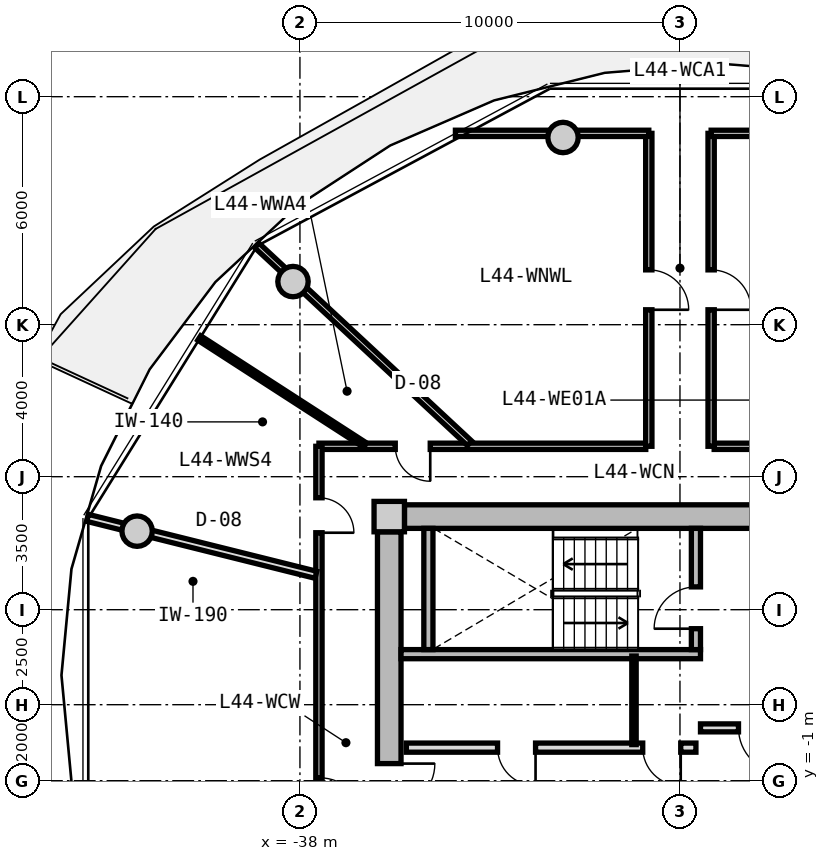
"""IFC4 building model, lengths in metres.
Left out: names, types, materials, properties, quantities, classifications, styles, units other than length and angle.
Written with IfcOpenShell. Run it as: python <this file> out.ifc"""

import sys

from ifc_helpers import new_model, si_unit, direction, frame, frame_2d, origin, origin_2d, place, context, subcontext, project, spatial, rectangle, circle, extrude, source, transform, mapped, element, fill, save


model = new_model("IFC4")
c1 = context("Model", 3, precision=1e-05, world=origin(), true_north=direction((0.0, 1.0)))
c2 = subcontext(c1, "Body", "Model", "MODEL_VIEW")
j1 = project(units=[si_unit("LENGTHUNIT", "METRE"), si_unit("PLANEANGLEUNIT", "RADIAN")], contexts=[c1])
p1 = place(None, origin())
s1 = spatial("IfcSite", under=j1, at=p1, CompositionType="ELEMENT")
p2 = place(p1, origin())
s2 = spatial("IfcBuilding", under=s1, at=p2, CompositionType="ELEMENT")
p3 = place(p2, frame((0.0, 0.0, 143.45)))
s3 = spatial("IfcBuildingStorey", under=s2, at=p3, CompositionType="ELEMENT", Elevation=143.45)
m1 = source(origin(), c2, "Body", "SweptSolid", [
    extrude(rectangle(XDim=0.8, YDim=0.8, at=origin_2d()), origin(), (0.0, 0.0, 1.0), 3.05),
])
p4 = place(p3, frame((-35.65, 5.95, 0.0), z_axis=(0.0, 0.0, 1.0), x_axis=(1.0, 0.0, 0.0)))
e1 = element("IfcColumn", 1, at=p4, inside=s3, PredefinedType="COLUMN", context=c2, shape_type="MappedRepresentation", body=[
    mapped(m1, transform((0.0, 0.0, 0.0), x_axis=(1.0, 0.0, 0.0), y_axis=(0.0, 1.0, 0.0), z_axis=(0.0, 0.0, 1.0), scale=1.0)),
])
m2 = source(origin(), c2, "Body", "SweptSolid", [
    extrude(rectangle(XDim=14.5, YDim=0.62, at=frame_2d((7.25, 0.0))), origin(), (0.0, 0.0, 1.0), 2.81),
])
p5 = place(p3, frame((-35.25, 5.95, 0.0), z_axis=(0.0, 0.0, 1.0), x_axis=(1.0, 0.0, 0.0)))
e2 = element("IfcWall", 2, at=p5, inside=s3, PredefinedType="SHEAR", context=c2, shape_type="MappedRepresentation", body=[
    mapped(m2, transform((0.0, 0.0, 0.0), x_axis=(1.0, 0.0, 0.0), y_axis=(0.0, 1.0, 0.0), z_axis=(0.0, 0.0, 1.0), scale=1.0)),
])
m3 = source(origin(), c2, "Body", "SweptSolid", [
    extrude(rectangle(XDim=11.1, YDim=0.62, at=frame_2d((5.55, 0.0))), origin(), (0.0, 0.0, 1.0), 2.81),
])
p6 = place(p3, frame((-35.65, -5.55, 0.0), z_axis=(0.0, 0.0, 1.0), x_axis=(0.0, 1.0, 0.0)))
e3 = element("IfcWall", 3, at=p6, inside=s3, PredefinedType="SHEAR", context=c2, shape_type="MappedRepresentation", body=[
    mapped(m3, transform((0.0, 0.0, 0.0), x_axis=(1.0, 0.0, 0.0), y_axis=(0.0, 1.0, 0.0), z_axis=(0.0, 0.0, 1.0), scale=1.0)),
])
p7 = place(p6, frame((3.8, 0.0, 0.0)))
e4 = element("IfcOpeningElement", 4, at=p7, cuts=e3, PredefinedType="OPENING", context=c2, shape_type="SweptSolid", body=[
    extrude(rectangle(XDim=1.2, YDim=2.15, at=frame_2d((0.6, 1.075))), frame((0.0, 0.32, 0.0), z_axis=(0.0, -1.0, 0.0), x_axis=(1.0, 0.0, 0.0)), (0.0, 0.0, 1.0), 0.64),
])
m4 = source(origin(), c2, "Body", "SweptSolid", [
    extrude(circle(Radius=0.4, at=origin_2d()), origin(), (0.0, 0.0, 1.0), 3.05),
])
for number, where, z_axis, x_axis in (
    (5, (-31.077, 15.926, 0.0), (0.0, 0.0, 1.0), (1.0, 0.0, 0.0)),
    (6, (-38.183, 12.135, 0.0), (0.0, 0.0, 1.0), (1.0, 0.0, 0.0)),
    (7, (-42.285, 5.567, 0.0), (0.0, 0.0, 1.0), (1.0, 0.0, 0.0)),
):
    element("IfcColumn", number, at=place(p3, frame(where, z_axis=z_axis, x_axis=x_axis)), inside=s3, PredefinedType="COLUMN", context=c2, shape_type="MappedRepresentation", body=[
        mapped(m4, transform((0.0, 0.0, 0.0), x_axis=(1.0, 0.0, 0.0), y_axis=(0.0, 1.0, 0.0), z_axis=(0.0, 0.0, 1.0), scale=1.0)),
    ])
m5 = source(origin(), c2, "Body", "SweptSolid", [
    extrude(rectangle(XDim=7.88, YDim=0.24, at=frame_2d((3.94, 0.0))), origin(), (0.0, 0.0, 1.0), 2.81),
])
p8 = place(p3, frame((-35.34, 2.33, 0.0), z_axis=(0.0, 0.0, 1.0), x_axis=(1.0, 0.0, 0.0)))
e8 = element("IfcWall", 8, at=p8, inside=s3, PredefinedType="PARTITIONING", context=c2, shape_type="MappedRepresentation", body=[
    mapped(m5, transform((0.0, 0.0, 0.0), x_axis=(1.0, 0.0, 0.0), y_axis=(0.0, 1.0, 0.0), z_axis=(0.0, 0.0, 1.0), scale=1.0)),
])
m6 = source(origin(), c2, "Body", "SweptSolid", [
    extrude(rectangle(XDim=3.19, YDim=0.24, at=frame_2d((1.595, 0.0))), origin(), (0.0, 0.0, 1.0), 2.81),
])
p9 = place(p3, frame((-34.62, 2.45, 0.0), z_axis=(0.0, 0.0, 1.0), x_axis=(0.0, 1.0, 0.0)))
e9 = element("IfcWall", 9, at=p9, inside=s3, PredefinedType="PARTITIONING", context=c2, shape_type="MappedRepresentation", body=[
    mapped(m6, transform((0.0, 0.0, 0.0), x_axis=(1.0, 0.0, 0.0), y_axis=(0.0, 1.0, 0.0), z_axis=(0.0, 0.0, 1.0), scale=1.0)),
])
p10 = place(p3, frame((-27.58, 2.45, 0.0), z_axis=(0.0, 0.0, 1.0), x_axis=(0.0, 1.0, 0.0)))
e10 = element("IfcWall", 10, at=p10, inside=s3, PredefinedType="PARTITIONING", context=c2, shape_type="MappedRepresentation", body=[
    mapped(m6, transform((0.0, 0.0, 0.0), x_axis=(1.0, 0.0, 0.0), y_axis=(0.0, 1.0, 0.0), z_axis=(0.0, 0.0, 1.0), scale=1.0)),
])
p11 = place(p10, frame((0.55, 0.0, 0.0)))
e11 = element("IfcOpeningElement", 11, at=p11, cuts=e10, PredefinedType="OPENING", context=c2, shape_type="SweptSolid", body=[
    extrude(rectangle(XDim=1.1, YDim=2.15, at=frame_2d((0.55, 1.075))), frame((0.0, 0.13, 0.0), z_axis=(0.0, -1.0, 0.0), x_axis=(1.0, 0.0, 0.0)), (0.0, 0.0, 1.0), 0.26),
])
m7 = source(origin(), c2, "Body", "SweptSolid", [
    extrude(rectangle(XDim=6.66, YDim=0.21, at=frame_2d((3.33, 0.0))), origin(), (0.0, 0.0, 1.0), 2.795),
])
p12 = place(p3, frame((-27.46, 0.39, 0.0), z_axis=(0.0, 0.0, 1.0), x_axis=(1.0, 0.0, 0.0)))
e12 = element("IfcWall", 12, at=p12, inside=s3, PredefinedType="PARTITIONING", context=c2, shape_type="MappedRepresentation", body=[
    mapped(m7, transform((0.0, 0.0, 0.0), x_axis=(1.0, 0.0, 0.0), y_axis=(0.0, 1.0, 0.0), z_axis=(0.0, 0.0, 1.0), scale=1.0)),
])
p13 = place(p12, frame((1.0, 0.0, 0.0)))
e13 = element("IfcOpeningElement", 13, at=p13, cuts=e12, PredefinedType="OPENING", context=c2, shape_type="SweptSolid", body=[
    extrude(rectangle(XDim=1.2, YDim=2.15, at=frame_2d((0.6, 1.075))), frame((0.0, 0.115, 0.0), z_axis=(0.0, -1.0, 0.0), x_axis=(1.0, 0.0, 0.0)), (0.0, 0.0, 1.0), 0.23),
])
m8 = source(origin(), c2, "Body", "SweptSolid", [
    extrude(rectangle(XDim=7.62, YDim=0.24, at=frame_2d((3.81, 0.0))), origin(), (0.0, 0.0, 1.0), 2.795),
])
p14 = place(p3, frame((-35.2, -0.13, 0.0), z_axis=(0.0, 0.0, 1.0), x_axis=(1.0, 0.0, 0.0)))
e14 = element("IfcWall", 14, at=p14, inside=s3, PredefinedType="PARTITIONING", context=c2, shape_type="MappedRepresentation", body=[
    mapped(m8, transform((0.0, 0.0, 0.0), x_axis=(1.0, 0.0, 0.0), y_axis=(0.0, 1.0, 0.0), z_axis=(0.0, 0.0, 1.0), scale=1.0)),
])
p15 = place(p14, frame((6.22, 0.0, 0.0)))
e15 = element("IfcOpeningElement", 15, at=p15, cuts=e14, PredefinedType="OPENING", context=c2, shape_type="SweptSolid", body=[
    extrude(rectangle(XDim=1.0, YDim=2.1, at=frame_2d((0.5, 1.05))), frame((0.0, 0.13, 0.0), z_axis=(0.0, -1.0, 0.0), x_axis=(1.0, 0.0, 0.0)), (0.0, 0.0, 1.0), 0.26),
])
p16 = place(p14, frame((2.4, 0.0, 0.0)))
e16 = element("IfcOpeningElement", 16, at=p16, cuts=e14, PredefinedType="OPENING", context=c2, shape_type="SweptSolid", body=[
    extrude(rectangle(XDim=1.0, YDim=2.1, at=frame_2d((0.5, 1.05))), frame((0.0, 0.13, 0.0), z_axis=(0.0, -1.0, 0.0), x_axis=(1.0, 0.0, 0.0)), (0.0, 0.0, 1.0), 0.26),
])
m9 = source(origin(), c2, "Body", "SweptSolid", [
    extrude(rectangle(XDim=2.33, YDim=0.115, at=frame_2d((1.165, 0.0))), origin(), (0.0, 0.0, 1.0), 2.795),
])
p17 = place(p3, frame((-29.21, -0.05, 0.0), z_axis=(0.0, 0.0, 1.0), x_axis=(0.0, 1.0, 0.0)))
e17 = element("IfcWall", 17, at=p17, inside=s3, PredefinedType="PARTITIONING", context=c2, shape_type="MappedRepresentation", body=[
    mapped(m9, transform((0.0, 0.0, 0.0), x_axis=(1.0, 0.0, 0.0), y_axis=(0.0, 1.0, 0.0), z_axis=(0.0, 0.0, 1.0), scale=1.0)),
])
m10 = source(origin(), c2, "Body", "SweptSolid", [
    extrude(rectangle(XDim=8.6, YDim=0.165, at=frame_2d((4.3, 0.0))), origin(), (0.0, 0.0, 1.0), 2.795),
])
p18 = place(p3, frame((-37.5, 7.8, 0.0), z_axis=(0.0, 0.0, 1.0), x_axis=(1.0, 0.0, 0.0)))
e18 = element("IfcWall", 18, at=p18, inside=s3, PredefinedType="PARTITIONING", context=c2, shape_type="MappedRepresentation", body=[
    mapped(m10, transform((0.0, 0.0, 0.0), x_axis=(1.0, 0.0, 0.0), y_axis=(0.0, 1.0, 0.0), z_axis=(0.0, 0.0, 1.0), scale=1.0)),
])
p19 = place(p18, frame((2.009, 0.0, 0.0)))
e19 = element("IfcOpeningElement", 19, at=p19, cuts=e18, PredefinedType="OPENING", context=c2, shape_type="SweptSolid", body=[
    extrude(rectangle(XDim=0.92, YDim=2.1, at=frame_2d((0.46, 1.05))), frame((0.0, 0.093, 0.0), z_axis=(0.0, -1.0, 0.0), x_axis=(1.0, 0.0, 0.0)), (0.0, 0.0, 1.0), 0.185),
])
p20 = place(p3, frame((-27.1, 7.8, 0.0), z_axis=(0.0, 0.0, 1.0), x_axis=(1.0, 0.0, 0.0)))
e20 = element("IfcWall", 20, at=p20, inside=s3, PredefinedType="PARTITIONING", context=c2, shape_type="MappedRepresentation", body=[
    mapped(m10, transform((0.0, 0.0, 0.0), x_axis=(1.0, 0.0, 0.0), y_axis=(0.0, 1.0, 0.0), z_axis=(0.0, 0.0, 1.0), scale=1.0)),
])
p21 = place(p20, frame((6.96, 0.0, 0.0)))
e21 = element("IfcOpeningElement", 21, at=p21, cuts=e20, PredefinedType="OPENING", context=c2, shape_type="SweptSolid", body=[
    extrude(rectangle(XDim=1.05, YDim=2.15, at=frame_2d((0.525, 1.075))), frame((0.0, 0.093, 0.0), z_axis=(0.0, -1.0, 0.0), x_axis=(1.0, 0.0, 0.0)), (0.0, 0.0, 1.0), 0.185),
])
p22 = place(p20, frame((3.904, 0.0, 0.0)))
e22 = element("IfcOpeningElement", 22, at=p22, cuts=e20, PredefinedType="OPENING", context=c2, shape_type="SweptSolid", body=[
    extrude(rectangle(XDim=1.05, YDim=2.15, at=frame_2d((0.525, 1.075))), frame((0.0, 0.093, 0.0), z_axis=(0.0, -1.0, 0.0), x_axis=(1.0, 0.0, 0.0)), (0.0, 0.0, 1.0), 0.185),
])
p23 = place(p20, frame((2.347, 0.0, 0.0)))
e23 = element("IfcOpeningElement", 23, at=p23, cuts=e20, PredefinedType="OPENING", context=c2, shape_type="SweptSolid", body=[
    extrude(rectangle(XDim=1.05, YDim=2.15, at=frame_2d((0.525, 1.075))), frame((0.0, 0.093, 0.0), z_axis=(0.0, -1.0, 0.0), x_axis=(1.0, 0.0, 0.0)), (0.0, 0.0, 1.0), 0.185),
])
m11 = source(origin(), c2, "Body", "SweptSolid", [
    extrude(rectangle(XDim=15.6, YDim=0.165, at=frame_2d((7.8, 0.0))), origin(), (0.0, 0.0, 1.0), 2.795),
])
p24 = place(p3, frame((-37.5, -7.8, 0.0), z_axis=(0.0, 0.0, 1.0), x_axis=(0.0, 1.0, 0.0)))
e24 = element("IfcWall", 24, at=p24, inside=s3, PredefinedType="PARTITIONING", context=c2, shape_type="MappedRepresentation", body=[
    mapped(m11, transform((0.0, 0.0, 0.0), x_axis=(1.0, 0.0, 0.0), y_axis=(0.0, 1.0, 0.0), z_axis=(0.0, 0.0, 1.0), scale=1.0)),
])
p25 = place(p24, frame((13.325, 0.0, 0.0)))
e25 = element("IfcOpeningElement", 25, at=p25, cuts=e24, PredefinedType="OPENING", context=c2, shape_type="SweptSolid", body=[
    extrude(rectangle(XDim=0.92, YDim=2.1, at=frame_2d((0.46, 1.05))), frame((0.0, 0.093, 0.0), z_axis=(0.0, -1.0, 0.0), x_axis=(1.0, 0.0, 0.0)), (0.0, 0.0, 1.0), 0.185),
])
p26 = place(p24, frame((5.628, 0.0, 0.0)))
e26 = element("IfcOpeningElement", 26, at=p26, cuts=e24, PredefinedType="OPENING", context=c2, shape_type="SweptSolid", body=[
    extrude(rectangle(XDim=1.25, YDim=2.2, at=frame_2d((0.625, 1.1))), frame((0.0, 0.093, 0.0), z_axis=(0.0, -1.0, 0.0), x_axis=(1.0, 0.0, 0.0)), (0.0, 0.0, 1.0), 0.185),
])
m12 = source(origin(), c2, "Body", "SweptSolid", [
    extrude(rectangle(XDim=7.648, YDim=0.165, at=frame_2d((3.824, 0.0))), origin(), (0.0, 0.0, 1.0), 2.345),
])
p27 = place(p3, frame((-33.538, 7.88, 0.0), z_axis=(0.0, 0.0, 1.0), x_axis=(-0.732167856666, 0.681124239522, 0.0)))
e27 = element("IfcWall", 27, at=p27, inside=s3, PredefinedType="PARTITIONING", context=c2, shape_type="MappedRepresentation", body=[
    mapped(m12, transform((0.0, 0.0, 0.0), x_axis=(1.0, 0.0, 0.0), y_axis=(0.0, 1.0, 0.0), z_axis=(0.0, 0.0, 1.0), scale=1.0)),
])
m13 = source(origin(), c2, "Body", "SweptSolid", [
    extrude(rectangle(XDim=8.235, YDim=0.165, at=frame_2d((4.118, 0.0))), origin(), (0.0, 0.0, 1.0), 2.795),
])
p28 = place(p3, frame((-28.82, 7.8, 0.0), z_axis=(0.0, 0.0, 1.0), x_axis=(0.0, 1.0, 0.0)))
e28 = element("IfcWall", 28, at=p28, inside=s3, PredefinedType="PARTITIONING", context=c2, shape_type="MappedRepresentation", body=[
    mapped(m13, transform((0.0, 0.0, 0.0), x_axis=(1.0, 0.0, 0.0), y_axis=(0.0, 1.0, 0.0), z_axis=(0.0, 0.0, 1.0), scale=1.0)),
])
p29 = place(p28, frame((3.593, 0.0, 0.0)))
e29 = element("IfcOpeningElement", 29, at=p29, cuts=e28, PredefinedType="OPENING", context=c2, shape_type="SweptSolid", body=[
    extrude(rectangle(XDim=1.05, YDim=2.15, at=frame_2d((0.525, 1.075))), frame((0.0, 0.093, 0.0), z_axis=(0.0, -1.0, 0.0), x_axis=(1.0, 0.0, 0.0)), (0.0, 0.0, 1.0), 0.185),
])
m14 = source(origin(), c2, "Body", "SweptSolid", [
    extrude(rectangle(XDim=5.089, YDim=0.165, at=frame_2d((2.544, 0.0))), origin(), (0.0, 0.0, 1.0), 2.345),
])
p30 = place(p3, frame((-33.909, 16.035, 0.0), z_axis=(0.0, 0.0, 1.0), x_axis=(1.0, 0.0, 0.0)))
e30 = element("IfcWall", 30, at=p30, inside=s3, PredefinedType="PARTITIONING", context=c2, shape_type="MappedRepresentation", body=[
    mapped(m14, transform((0.0, 0.0, 0.0), x_axis=(1.0, 0.0, 0.0), y_axis=(0.0, 1.0, 0.0), z_axis=(0.0, 0.0, 1.0), scale=1.0)),
])
p31 = place(p3, frame((-27.18, 7.8, 0.0), z_axis=(0.0, 0.0, 1.0), x_axis=(0.0, 1.0, 0.0)))
e31 = element("IfcWall", 31, at=p31, inside=s3, PredefinedType="PARTITIONING", context=c2, shape_type="MappedRepresentation", body=[
    mapped(m13, transform((0.0, 0.0, 0.0), x_axis=(1.0, 0.0, 0.0), y_axis=(0.0, 1.0, 0.0), z_axis=(0.0, 0.0, 1.0), scale=1.0)),
])
p32 = place(p31, frame((3.593, 0.0, 0.0)))
e32 = element("IfcOpeningElement", 32, at=p32, cuts=e31, PredefinedType="OPENING", context=c2, shape_type="SweptSolid", body=[
    extrude(rectangle(XDim=1.05, YDim=2.15, at=frame_2d((0.525, 1.075))), frame((0.0, 0.093, 0.0), z_axis=(0.0, -1.0, 0.0), x_axis=(1.0, 0.0, 0.0)), (0.0, 0.0, 1.0), 0.185),
])
m15 = source(origin(), c2, "Body", "SweptSolid", [
    extrude(rectangle(XDim=4.469, YDim=0.165, at=frame_2d((2.234, 0.0))), origin(), (0.0, 0.0, 1.0), 2.345),
])
p33 = place(p3, frame((-27.18, 16.035, 0.0), z_axis=(0.0, 0.0, 1.0), x_axis=(1.0, 0.0, 0.0)))
e33 = element("IfcWall", 33, at=p33, inside=s3, PredefinedType="PARTITIONING", context=c2, shape_type="MappedRepresentation", body=[
    mapped(m15, transform((0.0, 0.0, 0.0), x_axis=(1.0, 0.0, 0.0), y_axis=(0.0, 1.0, 0.0), z_axis=(0.0, 0.0, 1.0), scale=1.0)),
])
m16 = source(origin(), c2, "Body", "SweptSolid", [
    extrude(rectangle(XDim=6.193, YDim=0.19, at=frame_2d((3.096, 0.0))), origin(), (0.0, 0.0, 1.0), 2.345),
])
p34 = place(p3, frame((-37.58, 4.419, 0.0), z_axis=(0.0, 0.0, 1.0), x_axis=(-0.970309243466, 0.241867674657, 0.0)))
e34 = element("IfcWall", 34, at=p34, inside=s3, PredefinedType="PARTITIONING", context=c2, shape_type="MappedRepresentation", body=[
    mapped(m16, transform((0.0, 0.0, 0.0), x_axis=(1.0, 0.0, 0.0), y_axis=(0.0, 1.0, 0.0), z_axis=(0.0, 0.0, 1.0), scale=1.0)),
])
m17 = source(origin(), c2, "Body", "SweptSolid", [
    extrude(rectangle(XDim=5.197, YDim=0.14, at=frame_2d((2.598, 0.0))), origin(), (0.0, 0.0, 1.0), 2.795),
])
p35 = place(p3, frame((-36.286, 7.83, 0.0), z_axis=(0.0, 0.0, 1.0), x_axis=(-0.839929187515, 0.542696010637, 0.0)))
e35 = element("IfcWall", 35, at=p35, inside=s3, PredefinedType="PARTITIONING", context=c2, shape_type="MappedRepresentation", body=[
    mapped(m17, transform((0.0, 0.0, 0.0), x_axis=(1.0, 0.0, 0.0), y_axis=(0.0, 1.0, 0.0), z_axis=(0.0, 0.0, 1.0), scale=1.0)),
])
m18 = source(origin(), c2, "Body", "SweptSolid", [
    extrude(rectangle(XDim=1.1, YDim=2.15, at=frame_2d((0.55, 1.075))), frame((0.0, 0.025, 0.0), z_axis=(0.0, -1.0, 0.0), x_axis=(1.0, 0.0, 0.0)), (0.0, 0.0, 1.0), 0.05),
])
p36 = place(p11, origin())
e36 = element("IfcDoor", 36, at=p36, inside=s3, OperationType="SINGLE_SWING_LEFT", PredefinedType="DOOR", context=c2, shape_type="MappedRepresentation", body=[
    mapped(m18, transform((0.0, 0.0, 0.0), x_axis=(1.0, 0.0, 0.0), y_axis=(0.0, 1.0, 0.0), z_axis=(0.0, 0.0, 1.0), scale=1.0)),
])
fill(e11, e36)
m19 = source(origin(), c2, "Body", "SweptSolid", [
    extrude(rectangle(XDim=1.2, YDim=2.15, at=frame_2d((0.6, 1.075))), frame((0.0, 0.025, 0.0), z_axis=(0.0, -1.0, 0.0), x_axis=(1.0, 0.0, 0.0)), (0.0, 0.0, 1.0), 0.05),
])
p37 = place(p13, frame((1.2, 0.0, 0.0), z_axis=(0.0, 0.0, 1.0), x_axis=(-1.0, 0.0, 0.0)))
e37 = element("IfcDoor", 37, at=p37, inside=s3, OperationType="SINGLE_SWING_LEFT", PredefinedType="DOOR", context=c2, shape_type="MappedRepresentation", body=[
    mapped(m19, transform((0.0, 0.0, 0.0), x_axis=(1.0, 0.0, 0.0), y_axis=(0.0, 1.0, 0.0), z_axis=(0.0, 0.0, 1.0), scale=1.0)),
])
fill(e13, e37)
p38 = place(p7, frame((1.2, 0.0, 0.0), z_axis=(0.0, 0.0, 1.0), x_axis=(-1.0, 0.0, 0.0)))
e38 = element("IfcDoor", 38, at=p38, inside=s3, OperationType="SINGLE_SWING_LEFT", PredefinedType="DOOR", context=c2, shape_type="MappedRepresentation", body=[
    mapped(m19, transform((0.0, 0.0, 0.0), x_axis=(1.0, 0.0, 0.0), y_axis=(0.0, 1.0, 0.0), z_axis=(0.0, 0.0, 1.0), scale=1.0)),
])
fill(e4, e38)
m20 = source(origin(), c2, "Body", "SweptSolid", [
    extrude(rectangle(XDim=1.0, YDim=2.1, at=frame_2d((0.5, 1.05))), frame((0.0, 0.025, 0.0), z_axis=(0.0, -1.0, 0.0), x_axis=(1.0, 0.0, 0.0)), (0.0, 0.0, 1.0), 0.05),
])
p39 = place(p15, frame((1.0, 0.0, 0.0), z_axis=(0.0, 0.0, 1.0), x_axis=(-1.0, 0.0, 0.0)))
e39 = element("IfcDoor", 39, at=p39, inside=s3, OperationType="SINGLE_SWING_LEFT", PredefinedType="DOOR", context=c2, shape_type="MappedRepresentation", body=[
    mapped(m20, transform((0.0, 0.0, 0.0), x_axis=(1.0, 0.0, 0.0), y_axis=(0.0, 1.0, 0.0), z_axis=(0.0, 0.0, 1.0), scale=1.0)),
])
fill(e15, e39)
p40 = place(p16, frame((1.0, 0.0, 0.0), z_axis=(0.0, 0.0, 1.0), x_axis=(-1.0, 0.0, 0.0)))
e40 = element("IfcDoor", 40, at=p40, inside=s3, OperationType="SINGLE_SWING_LEFT", PredefinedType="DOOR", context=c2, shape_type="MappedRepresentation", body=[
    mapped(m20, transform((0.0, 0.0, 0.0), x_axis=(1.0, 0.0, 0.0), y_axis=(0.0, 1.0, 0.0), z_axis=(0.0, 0.0, 1.0), scale=1.0)),
])
fill(e16, e40)
m21 = source(origin(), c2, "Body", "SweptSolid", [
    extrude(rectangle(XDim=1.05, YDim=2.15, at=frame_2d((0.525, 1.075))), frame((0.0, 0.025, 0.0), z_axis=(0.0, -1.0, 0.0), x_axis=(1.0, 0.0, 0.0)), (0.0, 0.0, 1.0), 0.05),
])
p41 = place(p29, frame((1.05, 0.0, 0.0), z_axis=(0.0, 0.0, 1.0), x_axis=(-1.0, 0.0, 0.0)))
e41 = element("IfcDoor", 41, at=p41, inside=s3, OperationType="SINGLE_SWING_RIGHT", PredefinedType="DOOR", context=c2, shape_type="MappedRepresentation", body=[
    mapped(m21, transform((0.0, 0.0, 0.0), x_axis=(1.0, 0.0, 0.0), y_axis=(0.0, 1.0, 0.0), z_axis=(0.0, 0.0, 1.0), scale=1.0)),
])
fill(e29, e41)
p42 = place(p32, frame((1.05, 0.0, 0.0), z_axis=(0.0, 0.0, 1.0), x_axis=(-1.0, 0.0, 0.0)))
e42 = element("IfcDoor", 42, at=p42, inside=s3, OperationType="SINGLE_SWING_RIGHT", PredefinedType="DOOR", context=c2, shape_type="MappedRepresentation", body=[
    mapped(m21, transform((0.0, 0.0, 0.0), x_axis=(1.0, 0.0, 0.0), y_axis=(0.0, 1.0, 0.0), z_axis=(0.0, 0.0, 1.0), scale=1.0)),
])
fill(e32, e42)
m22 = source(origin(), c2, "Body", "SweptSolid", [
    extrude(rectangle(XDim=0.92, YDim=2.1, at=frame_2d((0.46, 1.05))), frame((0.0, 0.025, 0.0), z_axis=(0.0, -1.0, 0.0), x_axis=(1.0, 0.0, 0.0)), (0.0, 0.0, 1.0), 0.05),
])
p43 = place(p19, frame((0.92, 0.0, 0.0), z_axis=(0.0, 0.0, 1.0), x_axis=(-1.0, 0.0, 0.0)))
e43 = element("IfcDoor", 43, at=p43, inside=s3, OperationType="SINGLE_SWING_LEFT", PredefinedType="DOOR", context=c2, shape_type="MappedRepresentation", body=[
    mapped(m22, transform((0.0, 0.0, 0.0), x_axis=(1.0, 0.0, 0.0), y_axis=(0.0, 1.0, 0.0), z_axis=(0.0, 0.0, 1.0), scale=1.0)),
])
fill(e19, e43)
p44 = place(p25, frame((0.92, 0.0, 0.0), z_axis=(0.0, 0.0, 1.0), x_axis=(-1.0, 0.0, 0.0)))
e44 = element("IfcDoor", 44, at=p44, inside=s3, OperationType="SINGLE_SWING_RIGHT", PredefinedType="DOOR", context=c2, shape_type="MappedRepresentation", body=[
    mapped(m22, transform((0.0, 0.0, 0.0), x_axis=(1.0, 0.0, 0.0), y_axis=(0.0, 1.0, 0.0), z_axis=(0.0, 0.0, 1.0), scale=1.0)),
])
fill(e25, e44)
m23 = source(origin(), c2, "Body", "SweptSolid", [
    extrude(rectangle(XDim=1.25, YDim=2.2, at=frame_2d((0.625, 1.1))), frame((0.0, 0.025, 0.0), z_axis=(0.0, -1.0, 0.0), x_axis=(1.0, 0.0, 0.0)), (0.0, 0.0, 1.0), 0.05),
])
p45 = place(p26, frame((1.25, 0.0, 0.0), z_axis=(0.0, 0.0, 1.0), x_axis=(-1.0, 0.0, 0.0)))
e45 = element("IfcDoor", 45, at=p45, inside=s3, OperationType="SINGLE_SWING_RIGHT", PredefinedType="DOOR", context=c2, shape_type="MappedRepresentation", body=[
    mapped(m23, transform((0.0, 0.0, 0.0), x_axis=(1.0, 0.0, 0.0), y_axis=(0.0, 1.0, 0.0), z_axis=(0.0, 0.0, 1.0), scale=1.0)),
])
fill(e26, e45)
save(model, sys.argv[1])
